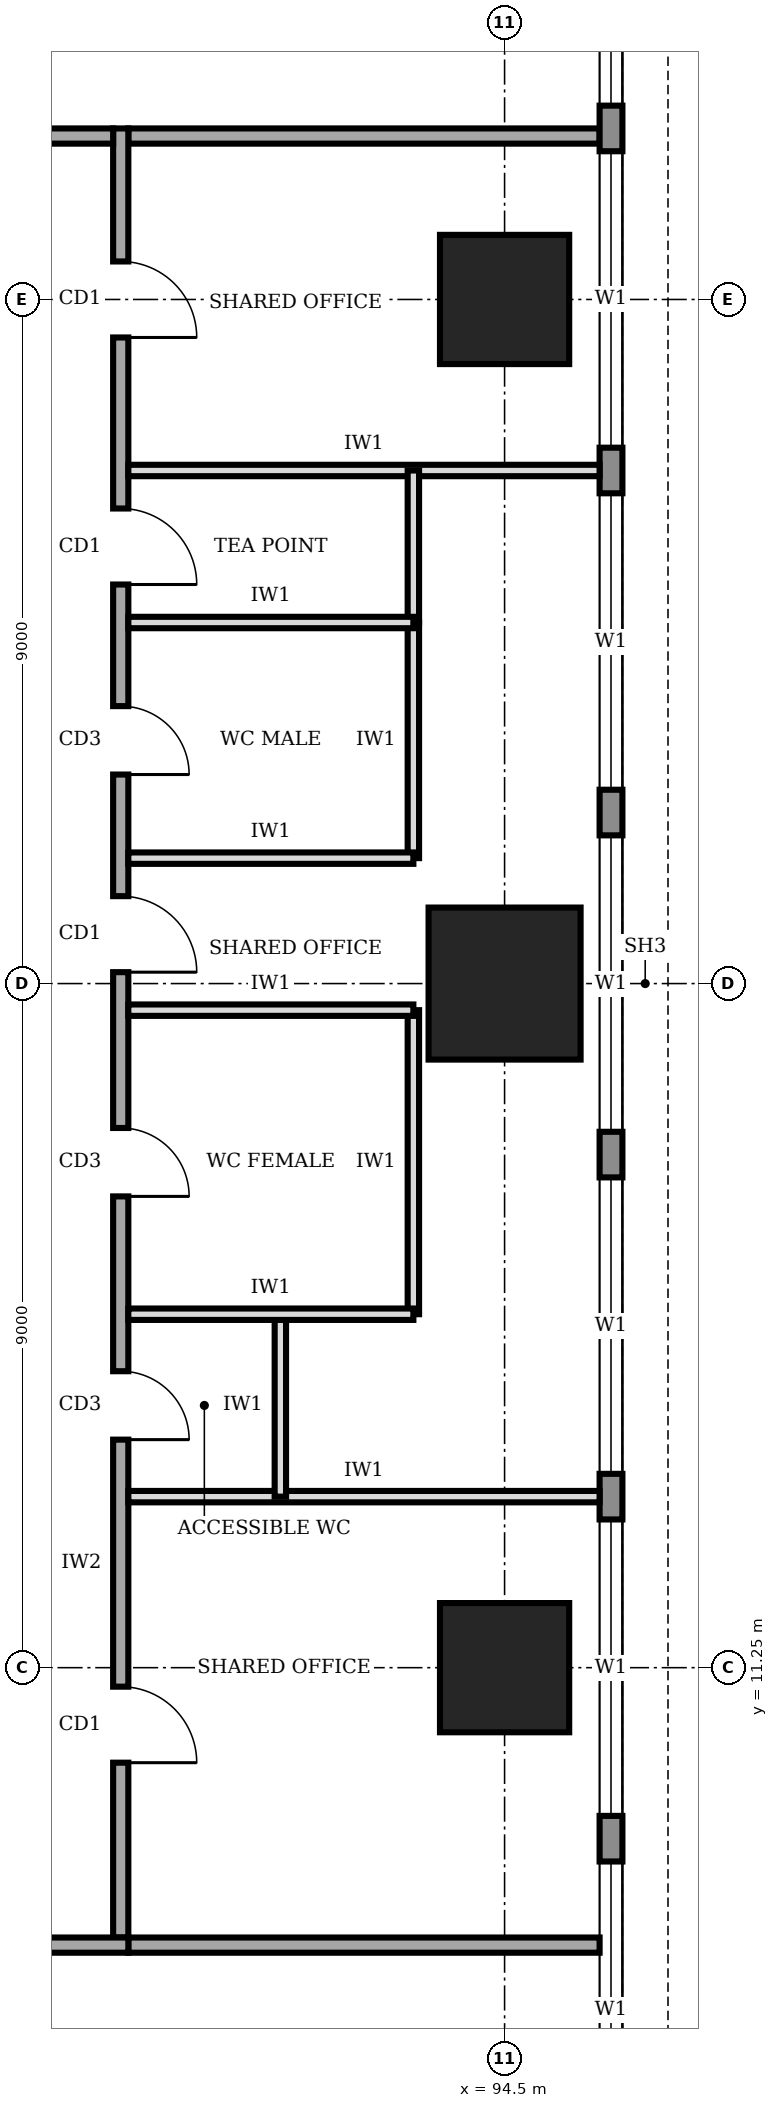
"""IFC4 building model, lengths in metres.
Left out: names, types, materials, properties, quantities, classifications, styles, units other than length and angle.
Written with IfcOpenShell. Run it as: python <this file> out.ifc"""

import sys

from ifc_helpers import new_model, si_unit, direction, frame, frame_2d, origin, origin_2d, place, context, subcontext, project, spatial, rectangle, extrude, element, fill, save


model = new_model("IFC4")
c1 = context("Model", 3, precision=1e-05, world=origin(), true_north=direction((0.0, 1.0)))
c2 = subcontext(c1, "Body", "Model", "MODEL_VIEW")
j1 = project(units=[si_unit("LENGTHUNIT", "METRE"), si_unit("PLANEANGLEUNIT", "RADIAN")], contexts=[c1])
p1 = place(None, origin())
s1 = spatial("IfcSite", under=j1, at=p1, CompositionType="ELEMENT")
p2 = place(p1, origin())
s2 = spatial("IfcBuilding", under=s1, at=p2, CompositionType="ELEMENT")
p3 = place(p2, frame((0.0, 0.0, 205.0)))
s3 = spatial("IfcBuildingStorey", under=s2, at=p3, CompositionType="ELEMENT", Elevation=205.0)
p4 = place(p3, frame((94.5, 11.25, 0.0), z_axis=(0.0, 0.0, 1.0), x_axis=(1.0, 0.0, 0.0)))
e1 = element("IfcColumn", 1, at=p4, inside=s3, PredefinedType="COLUMN", context=c2, shape_type="SweptSolid", body=[
    extrude(rectangle(XDim=1.7, YDim=1.7, at=origin_2d()), origin(), (0.0, 0.0, 1.0), 4.0),
])
p5 = place(p3, frame((94.5, 20.25, 0.0), z_axis=(0.0, 0.0, 1.0), x_axis=(1.0, 0.0, 0.0)))
e2 = element("IfcColumn", 2, at=p5, inside=s3, PredefinedType="COLUMN", context=c2, shape_type="SweptSolid", body=[
    extrude(rectangle(XDim=2.0, YDim=2.0, at=origin_2d()), origin(), (0.0, 0.0, 1.0), 4.0),
])
p6 = place(p3, frame((94.5, 29.25, 0.0), z_axis=(0.0, 0.0, 1.0), x_axis=(1.0, 0.0, 0.0)))
e3 = element("IfcColumn", 3, at=p6, inside=s3, PredefinedType="COLUMN", context=c2, shape_type="SweptSolid", body=[
    extrude(rectangle(XDim=1.7, YDim=1.7, at=origin_2d()), origin(), (0.0, 0.0, 1.0), 4.0),
])
p7 = place(p3, frame((95.9, 3.32, 0.0), z_axis=(0.0, 0.0, 1.0), x_axis=(0.0, 1.0, 0.0)))
e4 = element("IfcWall", 4, at=p7, inside=s3, PredefinedType="STANDARD", context=c2, shape_type="SweptSolid", body=[
    extrude(rectangle(XDim=33.86, YDim=0.3, at=frame_2d((16.93, 0.0))), origin(), (0.0, 0.0, 1.0), 3.75),
])
p8 = place(p7, frame((1.48, 0.0, 0.9)))
e5 = element("IfcOpeningElement", 5, at=p8, cuts=e4, PredefinedType="OPENING", context=c2, shape_type="SweptSolid", body=[
    extrude(rectangle(XDim=3.9, YDim=2.2, at=frame_2d((1.95, 1.1))), frame((0.0, 0.16, 0.0), z_axis=(0.0, -1.0, 0.0), x_axis=(1.0, 0.0, 0.0)), (0.0, 0.0, 1.0), 0.32),
])
p9 = place(p7, frame((5.98, 0.0, 0.9)))
e6 = element("IfcOpeningElement", 6, at=p9, cuts=e4, PredefinedType="OPENING", context=c2, shape_type="SweptSolid", body=[
    extrude(rectangle(XDim=3.9, YDim=2.2, at=frame_2d((1.95, 1.1))), frame((0.0, 0.16, 0.0), z_axis=(0.0, -1.0, 0.0), x_axis=(1.0, 0.0, 0.0)), (0.0, 0.0, 1.0), 0.32),
])
p10 = place(p7, frame((10.48, 0.0, 0.9)))
e7 = element("IfcOpeningElement", 7, at=p10, cuts=e4, PredefinedType="OPENING", context=c2, shape_type="SweptSolid", body=[
    extrude(rectangle(XDim=3.9, YDim=2.2, at=frame_2d((1.95, 1.1))), frame((0.0, 0.16, 0.0), z_axis=(0.0, -1.0, 0.0), x_axis=(1.0, 0.0, 0.0)), (0.0, 0.0, 1.0), 0.32),
])
p11 = place(p7, frame((14.98, 0.0, 0.9)))
e8 = element("IfcOpeningElement", 8, at=p11, cuts=e4, PredefinedType="OPENING", context=c2, shape_type="SweptSolid", body=[
    extrude(rectangle(XDim=3.9, YDim=2.2, at=frame_2d((1.95, 1.1))), frame((0.0, 0.16, 0.0), z_axis=(0.0, -1.0, 0.0), x_axis=(1.0, 0.0, 0.0)), (0.0, 0.0, 1.0), 0.32),
])
p12 = place(p7, frame((19.48, 0.0, 0.9)))
e9 = element("IfcOpeningElement", 9, at=p12, cuts=e4, PredefinedType="OPENING", context=c2, shape_type="SweptSolid", body=[
    extrude(rectangle(XDim=3.9, YDim=2.2, at=frame_2d((1.95, 1.1))), frame((0.0, 0.16, 0.0), z_axis=(0.0, -1.0, 0.0), x_axis=(1.0, 0.0, 0.0)), (0.0, 0.0, 1.0), 0.32),
])
p13 = place(p7, frame((23.98, 0.0, 0.9)))
e10 = element("IfcOpeningElement", 10, at=p13, cuts=e4, PredefinedType="OPENING", context=c2, shape_type="SweptSolid", body=[
    extrude(rectangle(XDim=3.9, YDim=2.2, at=frame_2d((1.95, 1.1))), frame((0.0, 0.16, 0.0), z_axis=(0.0, -1.0, 0.0), x_axis=(1.0, 0.0, 0.0)), (0.0, 0.0, 1.0), 0.32),
])
p14 = place(p7, frame((28.48, 0.0, 0.9)))
e11 = element("IfcOpeningElement", 11, at=p14, cuts=e4, PredefinedType="OPENING", context=c2, shape_type="SweptSolid", body=[
    extrude(rectangle(XDim=3.9, YDim=2.2, at=frame_2d((1.95, 1.1))), frame((0.0, 0.16, 0.0), z_axis=(0.0, -1.0, 0.0), x_axis=(1.0, 0.0, 0.0)), (0.0, 0.0, 1.0), 0.32),
])
p15 = place(p3, frame((72.65, 7.6, 0.0), z_axis=(0.0, 0.0, 1.0), x_axis=(1.0, 0.0, 0.0)))
e12 = element("IfcWall", 12, at=p15, inside=s3, PredefinedType="SOLIDWALL", context=c2, shape_type="SweptSolid", body=[
    extrude(rectangle(XDim=16.9, YDim=0.2, at=frame_2d((8.45, 0.0))), origin(), (0.0, 0.0, 1.0), 3.75),
])
p16 = place(p15, frame((7.45, 0.0, 0.0)))
e13 = element("IfcOpeningElement", 13, at=p16, cuts=e12, PredefinedType="OPENING", context=c2, shape_type="SweptSolid", body=[
    extrude(rectangle(XDim=1.8, YDim=2.1, at=frame_2d((0.9, 1.05))), frame((0.0, 0.11, 0.0), z_axis=(0.0, -1.0, 0.0), x_axis=(1.0, 0.0, 0.0)), (0.0, 0.0, 1.0), 0.22),
])
p17 = place(p3, frame((89.45, 7.7, 0.0), z_axis=(0.0, 0.0, 1.0), x_axis=(0.0, 1.0, 0.0)))
e14 = element("IfcWall", 14, at=p17, inside=s3, PredefinedType="SOLIDWALL", context=c2, shape_type="SweptSolid", body=[
    extrude(rectangle(XDim=23.8, YDim=0.2, at=frame_2d((11.9, 0.0))), origin(), (0.0, 0.0, 1.0), 3.75),
])
p18 = place(p17, frame((2.3, 0.0, 0.0)))
e15 = element("IfcOpeningElement", 15, at=p18, cuts=e14, PredefinedType="OPENING", context=c2, shape_type="SweptSolid", body=[
    extrude(rectangle(XDim=1.0, YDim=2.1, at=frame_2d((0.5, 1.05))), frame((0.0, 0.11, 0.0), z_axis=(0.0, -1.0, 0.0), x_axis=(1.0, 0.0, 0.0)), (0.0, 0.0, 1.0), 0.22),
])
p19 = place(p17, frame((6.55, 0.0, 0.0)))
e16 = element("IfcOpeningElement", 16, at=p19, cuts=e14, PredefinedType="OPENING", context=c2, shape_type="SweptSolid", body=[
    extrude(rectangle(XDim=0.9, YDim=2.1, at=frame_2d((0.45, 1.05))), frame((0.0, 0.11, 0.0), z_axis=(0.0, -1.0, 0.0), x_axis=(1.0, 0.0, 0.0)), (0.0, 0.0, 1.0), 0.22),
])
p20 = place(p17, frame((9.75, 0.0, 0.0)))
e17 = element("IfcOpeningElement", 17, at=p20, cuts=e14, PredefinedType="OPENING", context=c2, shape_type="SweptSolid", body=[
    extrude(rectangle(XDim=0.9, YDim=2.1, at=frame_2d((0.45, 1.05))), frame((0.0, 0.11, 0.0), z_axis=(0.0, -1.0, 0.0), x_axis=(1.0, 0.0, 0.0)), (0.0, 0.0, 1.0), 0.22),
])
p21 = place(p17, frame((15.3, 0.0, 0.0)))
e18 = element("IfcOpeningElement", 18, at=p21, cuts=e14, PredefinedType="OPENING", context=c2, shape_type="SweptSolid", body=[
    extrude(rectangle(XDim=0.9, YDim=2.1, at=frame_2d((0.45, 1.05))), frame((0.0, 0.11, 0.0), z_axis=(0.0, -1.0, 0.0), x_axis=(1.0, 0.0, 0.0)), (0.0, 0.0, 1.0), 0.22),
])
p22 = place(p17, frame((17.8, 0.0, 0.0)))
e19 = element("IfcOpeningElement", 19, at=p22, cuts=e14, PredefinedType="OPENING", context=c2, shape_type="SweptSolid", body=[
    extrude(rectangle(XDim=1.0, YDim=2.1, at=frame_2d((0.5, 1.05))), frame((0.0, 0.11, 0.0), z_axis=(0.0, -1.0, 0.0), x_axis=(1.0, 0.0, 0.0)), (0.0, 0.0, 1.0), 0.22),
])
p23 = place(p17, frame((12.7, 0.0, 0.0)))
e20 = element("IfcOpeningElement", 20, at=p23, cuts=e14, PredefinedType="OPENING", context=c2, shape_type="SweptSolid", body=[
    extrude(rectangle(XDim=1.0, YDim=2.1, at=frame_2d((0.5, 1.05))), frame((0.0, 0.11, 0.0), z_axis=(0.0, -1.0, 0.0), x_axis=(1.0, 0.0, 0.0)), (0.0, 0.0, 1.0), 0.22),
])
p24 = place(p17, frame((21.05, 0.0, 0.0)))
e21 = element("IfcOpeningElement", 21, at=p24, cuts=e14, PredefinedType="OPENING", context=c2, shape_type="SweptSolid", body=[
    extrude(rectangle(XDim=1.0, YDim=2.1, at=frame_2d((0.5, 1.05))), frame((0.0, 0.11, 0.0), z_axis=(0.0, -1.0, 0.0), x_axis=(1.0, 0.0, 0.0)), (0.0, 0.0, 1.0), 0.22),
])
p25 = place(p3, frame((89.35, 31.4, 0.0), z_axis=(0.0, 0.0, 1.0), x_axis=(-1.0, 0.0, 0.0)))
e22 = element("IfcWall", 22, at=p25, inside=s3, PredefinedType="SOLIDWALL", context=c2, shape_type="SweptSolid", body=[
    extrude(rectangle(XDim=16.9, YDim=0.2, at=frame_2d((8.45, 0.0))), origin(), (0.0, 0.0, 1.0), 3.75),
])
p26 = place(p25, frame((14.375, 0.0, 0.0)))
e23 = element("IfcOpeningElement", 23, at=p26, cuts=e22, PredefinedType="OPENING", context=c2, shape_type="SweptSolid", body=[
    extrude(rectangle(XDim=1.0, YDim=2.1, at=frame_2d((0.5, 1.05))), frame((0.0, 0.11, 0.0), z_axis=(0.0, -1.0, 0.0), x_axis=(1.0, 0.0, 0.0)), (0.0, 0.0, 1.0), 0.22),
])
p27 = place(p25, frame((10.1, 0.0, 0.0)))
e24 = element("IfcOpeningElement", 24, at=p27, cuts=e22, PredefinedType="OPENING", context=c2, shape_type="SweptSolid", body=[
    extrude(rectangle(XDim=1.0, YDim=2.1, at=frame_2d((0.5, 1.05))), frame((0.0, 0.11, 0.0), z_axis=(0.0, -1.0, 0.0), x_axis=(1.0, 0.0, 0.0)), (0.0, 0.0, 1.0), 0.22),
])
for number, where, z_axis, x_axis in (
    (25, (89.55, 7.6, 0.0), (0.0, 0.0, 1.0), (1.0, 0.0, 0.0)),
    (26, (89.55, 31.4, 0.0), (0.0, 0.0, 1.0), (1.0, 0.0, 0.0)),
):
    element("IfcWall", number, at=place(p3, frame(where, z_axis=z_axis, x_axis=x_axis)), inside=s3, PredefinedType="SOLIDWALL", context=c2, shape_type="SweptSolid", body=[
        extrude(rectangle(XDim=6.2, YDim=0.2, at=frame_2d((3.1, 0.0))), origin(), (0.0, 0.0, 1.0), 3.75),
    ])
for number, where, z_axis, x_axis in (
    (27, (89.55, 13.5, 0.0), (0.0, 0.0, 1.0), (1.0, 0.0, 0.0)),
    (28, (89.55, 27.0, 0.0), (0.0, 0.0, 1.0), (1.0, 0.0, 0.0)),
):
    element("IfcWall", number, at=place(p3, frame(where, z_axis=z_axis, x_axis=x_axis)), inside=s3, PredefinedType="PARTITIONING", context=c2, shape_type="SweptSolid", body=[
        extrude(rectangle(XDim=6.2, YDim=0.15, at=frame_2d((3.1, 0.0))), origin(), (0.0, 0.0, 1.0), 3.75),
    ])
p28 = place(p3, frame((89.55, 15.9, 0.0), z_axis=(0.0, 0.0, 1.0), x_axis=(1.0, 0.0, 0.0)))
e29 = element("IfcWall", 29, at=p28, inside=s3, PredefinedType="PARTITIONING", context=c2, shape_type="SweptSolid", body=[
    extrude(rectangle(XDim=3.75, YDim=0.15, at=frame_2d((1.875, 0.0))), origin(), (0.0, 0.0, 1.0), 3.75),
])
p29 = place(p3, frame((89.55, 19.9, 0.0), z_axis=(0.0, 0.0, 1.0), x_axis=(1.0, 0.0, 0.0)))
e30 = element("IfcWall", 30, at=p29, inside=s3, PredefinedType="PARTITIONING", context=c2, shape_type="SweptSolid", body=[
    extrude(rectangle(XDim=3.75, YDim=0.15, at=frame_2d((1.875, 0.0))), origin(), (0.0, 0.0, 1.0), 2.85),
])
for number, where, z_axis, x_axis in (
    (31, (89.55, 21.9, 0.0), (0.0, 0.0, 1.0), (1.0, 0.0, 0.0)),
    (32, (89.55, 25.0, 0.0), (0.0, 0.0, 1.0), (1.0, 0.0, 0.0)),
):
    element("IfcWall", number, at=place(p3, frame(where, z_axis=z_axis, x_axis=x_axis)), inside=s3, PredefinedType="PARTITIONING", context=c2, shape_type="SweptSolid", body=[
        extrude(rectangle(XDim=3.75, YDim=0.15, at=frame_2d((1.875, 0.0))), origin(), (0.0, 0.0, 1.0), 3.75),
    ])
p30 = place(p3, frame((91.55, 13.5, 0.0), z_axis=(0.0, 0.0, 1.0), x_axis=(0.0, 1.0, 0.0)))
e33 = element("IfcWall", 33, at=p30, inside=s3, PredefinedType="PARTITIONING", context=c2, shape_type="SweptSolid", body=[
    extrude(rectangle(XDim=2.4, YDim=0.15, at=frame_2d((1.2, 0.0))), origin(), (0.0, 0.0, 1.0), 3.75),
])
p31 = place(p3, frame((93.3, 15.9, 0.0), z_axis=(0.0, 0.0, 1.0), x_axis=(0.0, 1.0, 0.0)))
e34 = element("IfcWall", 34, at=p31, inside=s3, PredefinedType="PARTITIONING", context=c2, shape_type="SweptSolid", body=[
    extrude(rectangle(XDim=4.0, YDim=0.15, at=frame_2d((2.0, 0.0))), origin(), (0.0, 0.0, 1.0), 3.75),
])
p32 = place(p3, frame((93.3, 21.9, 0.0), z_axis=(0.0, 0.0, 1.0), x_axis=(0.0, 1.0, 0.0)))
e35 = element("IfcWall", 35, at=p32, inside=s3, PredefinedType="PARTITIONING", context=c2, shape_type="SweptSolid", body=[
    extrude(rectangle(XDim=3.1, YDim=0.15, at=frame_2d((1.55, 0.0))), origin(), (0.0, 0.0, 1.0), 3.75),
])
p33 = place(p3, frame((93.3, 25.0, 0.0), z_axis=(0.0, 0.0, 1.0), x_axis=(0.0, 1.0, 0.0)))
e36 = element("IfcWall", 36, at=p33, inside=s3, PredefinedType="PARTITIONING", context=c2, shape_type="SweptSolid", body=[
    extrude(rectangle(XDim=2.0, YDim=0.15, at=frame_2d((1.0, 0.0))), origin(), (0.0, 0.0, 1.0), 3.75),
])
p34 = place(p8, origin())
e37 = element("IfcWindow", 37, at=p34, inside=s3, PartitioningType="SINGLE_PANEL", PredefinedType="WINDOW", context=c2, shape_type="SweptSolid", body=[
    extrude(rectangle(XDim=3.9, YDim=2.2, at=frame_2d((1.95, 1.1))), frame((0.0, 0.03, 0.0), z_axis=(0.0, -1.0, 0.0), x_axis=(1.0, 0.0, 0.0)), (0.0, 0.0, 1.0), 0.06),
])
fill(e5, e37)
p35 = place(p9, origin())
e38 = element("IfcWindow", 38, at=p35, inside=s3, PartitioningType="SINGLE_PANEL", PredefinedType="WINDOW", context=c2, shape_type="SweptSolid", body=[
    extrude(rectangle(XDim=3.9, YDim=2.2, at=frame_2d((1.95, 1.1))), frame((0.0, 0.03, 0.0), z_axis=(0.0, -1.0, 0.0), x_axis=(1.0, 0.0, 0.0)), (0.0, 0.0, 1.0), 0.06),
])
fill(e6, e38)
p36 = place(p10, origin())
e39 = element("IfcWindow", 39, at=p36, inside=s3, PartitioningType="SINGLE_PANEL", PredefinedType="WINDOW", context=c2, shape_type="SweptSolid", body=[
    extrude(rectangle(XDim=3.9, YDim=2.2, at=frame_2d((1.95, 1.1))), frame((0.0, 0.03, 0.0), z_axis=(0.0, -1.0, 0.0), x_axis=(1.0, 0.0, 0.0)), (0.0, 0.0, 1.0), 0.06),
])
fill(e7, e39)
p37 = place(p11, origin())
e40 = element("IfcWindow", 40, at=p37, inside=s3, PartitioningType="SINGLE_PANEL", PredefinedType="WINDOW", context=c2, shape_type="SweptSolid", body=[
    extrude(rectangle(XDim=3.9, YDim=2.2, at=frame_2d((1.95, 1.1))), frame((0.0, 0.03, 0.0), z_axis=(0.0, -1.0, 0.0), x_axis=(1.0, 0.0, 0.0)), (0.0, 0.0, 1.0), 0.06),
])
fill(e8, e40)
p38 = place(p12, origin())
e41 = element("IfcWindow", 41, at=p38, inside=s3, PartitioningType="SINGLE_PANEL", PredefinedType="WINDOW", context=c2, shape_type="SweptSolid", body=[
    extrude(rectangle(XDim=3.9, YDim=2.2, at=frame_2d((1.95, 1.1))), frame((0.0, 0.03, 0.0), z_axis=(0.0, -1.0, 0.0), x_axis=(1.0, 0.0, 0.0)), (0.0, 0.0, 1.0), 0.06),
])
fill(e9, e41)
p39 = place(p13, origin())
e42 = element("IfcWindow", 42, at=p39, inside=s3, PartitioningType="SINGLE_PANEL", PredefinedType="WINDOW", context=c2, shape_type="SweptSolid", body=[
    extrude(rectangle(XDim=3.9, YDim=2.2, at=frame_2d((1.95, 1.1))), frame((0.0, 0.03, 0.0), z_axis=(0.0, -1.0, 0.0), x_axis=(1.0, 0.0, 0.0)), (0.0, 0.0, 1.0), 0.06),
])
fill(e10, e42)
p40 = place(p14, origin())
e43 = element("IfcWindow", 43, at=p40, inside=s3, PartitioningType="SINGLE_PANEL", PredefinedType="WINDOW", context=c2, shape_type="SweptSolid", body=[
    extrude(rectangle(XDim=3.9, YDim=2.2, at=frame_2d((1.95, 1.1))), frame((0.0, 0.03, 0.0), z_axis=(0.0, -1.0, 0.0), x_axis=(1.0, 0.0, 0.0)), (0.0, 0.0, 1.0), 0.06),
])
fill(e11, e43)
p41 = place(p18, frame((1.0, 0.0, 0.0), z_axis=(0.0, 0.0, 1.0), x_axis=(-1.0, 0.0, 0.0)))
e44 = element("IfcDoor", 44, at=p41, inside=s3, OperationType="SINGLE_SWING_RIGHT", PredefinedType="DOOR", context=c2, shape_type="SweptSolid", body=[
    extrude(rectangle(XDim=1.0, YDim=2.1, at=frame_2d((0.5, 1.05))), frame((0.0, 0.025, 0.0), z_axis=(0.0, -1.0, 0.0), x_axis=(1.0, 0.0, 0.0)), (0.0, 0.0, 1.0), 0.05),
])
fill(e15, e44)
p42 = place(p19, frame((0.9, 0.0, 0.0), z_axis=(0.0, 0.0, 1.0), x_axis=(-1.0, 0.0, 0.0)))
e45 = element("IfcDoor", 45, at=p42, inside=s3, OperationType="SINGLE_SWING_RIGHT", PredefinedType="DOOR", context=c2, shape_type="SweptSolid", body=[
    extrude(rectangle(XDim=0.9, YDim=2.1, at=frame_2d((0.45, 1.05))), frame((0.0, 0.025, 0.0), z_axis=(0.0, -1.0, 0.0), x_axis=(1.0, 0.0, 0.0)), (0.0, 0.0, 1.0), 0.05),
])
fill(e16, e45)
p43 = place(p20, frame((0.9, 0.0, 0.0), z_axis=(0.0, 0.0, 1.0), x_axis=(-1.0, 0.0, 0.0)))
e46 = element("IfcDoor", 46, at=p43, inside=s3, OperationType="SINGLE_SWING_RIGHT", PredefinedType="DOOR", context=c2, shape_type="SweptSolid", body=[
    extrude(rectangle(XDim=0.9, YDim=2.1, at=frame_2d((0.45, 1.05))), frame((0.0, 0.025, 0.0), z_axis=(0.0, -1.0, 0.0), x_axis=(1.0, 0.0, 0.0)), (0.0, 0.0, 1.0), 0.05),
])
fill(e17, e46)
p44 = place(p21, frame((0.9, 0.0, 0.0), z_axis=(0.0, 0.0, 1.0), x_axis=(-1.0, 0.0, 0.0)))
e47 = element("IfcDoor", 47, at=p44, inside=s3, OperationType="SINGLE_SWING_RIGHT", PredefinedType="DOOR", context=c2, shape_type="SweptSolid", body=[
    extrude(rectangle(XDim=0.9, YDim=2.1, at=frame_2d((0.45, 1.05))), frame((0.0, 0.025, 0.0), z_axis=(0.0, -1.0, 0.0), x_axis=(1.0, 0.0, 0.0)), (0.0, 0.0, 1.0), 0.05),
])
fill(e18, e47)
p45 = place(p22, frame((1.0, 0.0, 0.0), z_axis=(0.0, 0.0, 1.0), x_axis=(-1.0, 0.0, 0.0)))
e48 = element("IfcDoor", 48, at=p45, inside=s3, OperationType="SINGLE_SWING_RIGHT", PredefinedType="DOOR", context=c2, shape_type="SweptSolid", body=[
    extrude(rectangle(XDim=1.0, YDim=2.1, at=frame_2d((0.5, 1.05))), frame((0.0, 0.025, 0.0), z_axis=(0.0, -1.0, 0.0), x_axis=(1.0, 0.0, 0.0)), (0.0, 0.0, 1.0), 0.05),
])
fill(e19, e48)
p46 = place(p23, frame((1.0, 0.0, 0.0), z_axis=(0.0, 0.0, 1.0), x_axis=(-1.0, 0.0, 0.0)))
e49 = element("IfcDoor", 49, at=p46, inside=s3, OperationType="SINGLE_SWING_RIGHT", PredefinedType="DOOR", context=c2, shape_type="SweptSolid", body=[
    extrude(rectangle(XDim=1.0, YDim=2.1, at=frame_2d((0.5, 1.05))), frame((0.0, 0.025, 0.0), z_axis=(0.0, -1.0, 0.0), x_axis=(1.0, 0.0, 0.0)), (0.0, 0.0, 1.0), 0.05),
])
fill(e20, e49)
p47 = place(p24, frame((1.0, 0.0, 0.0), z_axis=(0.0, 0.0, 1.0), x_axis=(-1.0, 0.0, 0.0)))
e50 = element("IfcDoor", 50, at=p47, inside=s3, OperationType="SINGLE_SWING_RIGHT", PredefinedType="DOOR", context=c2, shape_type="SweptSolid", body=[
    extrude(rectangle(XDim=1.0, YDim=2.1, at=frame_2d((0.5, 1.05))), frame((0.0, 0.025, 0.0), z_axis=(0.0, -1.0, 0.0), x_axis=(1.0, 0.0, 0.0)), (0.0, 0.0, 1.0), 0.05),
])
fill(e21, e50)
save(model, sys.argv[1])
